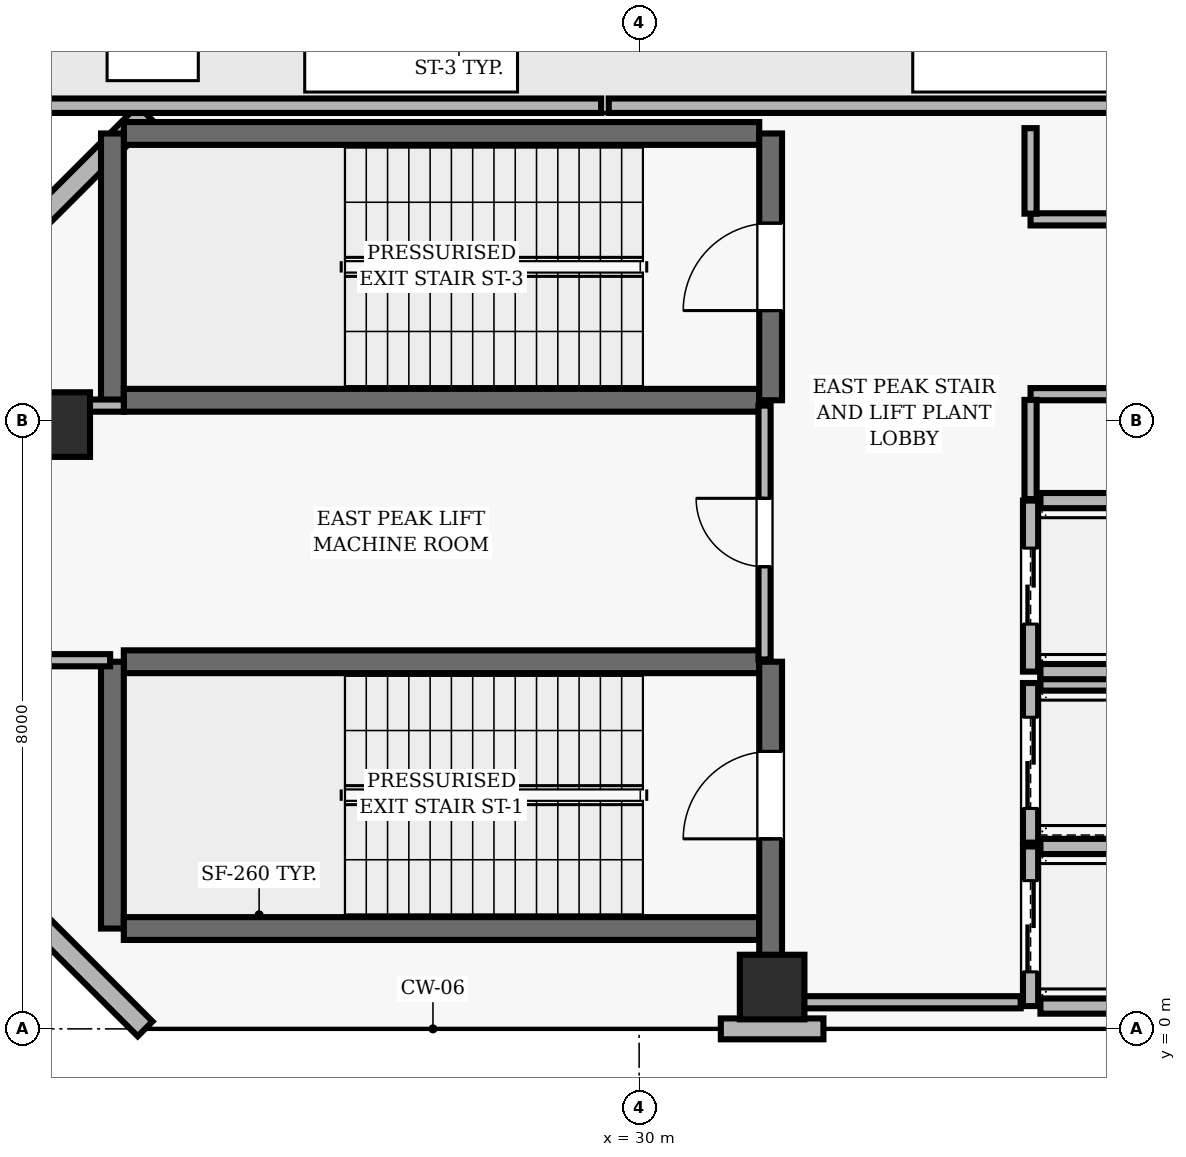
"""IFC4 building model, lengths in metres.
Left out: names, types, materials, properties, quantities, classifications, styles, units other than length and angle.
Written with IfcOpenShell. Run it as: python <this file> out.ifc"""

import sys

from ifc_helpers import new_model, si_unit, direction, frame, frame_2d, origin, origin_2d, place, context, subcontext, project, spatial, rectangle, extrude, element, fill, save


model = new_model("IFC4")
c1 = context("Model", 3, precision=1e-05, world=origin(), true_north=direction((0.0, 1.0)))
c2 = subcontext(c1, "Body", "Model", "MODEL_VIEW")
j1 = project(units=[si_unit("LENGTHUNIT", "METRE"), si_unit("PLANEANGLEUNIT", "RADIAN")], contexts=[c1])
p1 = place(None, origin())
s1 = spatial("IfcSite", under=j1, at=p1, CompositionType="ELEMENT")
p2 = place(p1, origin())
s2 = spatial("IfcBuilding", under=s1, at=p2, CompositionType="ELEMENT")
p3 = place(p2, frame((0.0, 0.0, 316.7)))
s3 = spatial("IfcBuildingStorey", under=s2, at=p3, CompositionType="ELEMENT", Elevation=316.7)
for number, where, z_axis, x_axis in (
    (1, (31.75, 0.55, 0.0), (0.0, 0.0, 1.0), (1.0, 0.0, 0.0)),
    (2, (22.35, 7.95, 0.0), (0.0, 0.0, 1.0), (1.0, 0.0, 0.0)),
):
    element("IfcColumn", number, at=place(p3, frame(where, z_axis=z_axis, x_axis=x_axis)), inside=s3, PredefinedType="COLUMN", context=c2, shape_type="SweptSolid", body=[
        extrude(rectangle(XDim=0.85, YDim=0.85, at=origin_2d()), origin(), (0.0, 0.0, 1.0), 5.0),
    ])
p4 = place(p3, frame((31.075, 0.0, 0.0), z_axis=(0.0, 0.0, 1.0), x_axis=(1.0, 0.0, 0.0)))
e3 = element("IfcWall", 3, at=p4, inside=s3, PredefinedType="SOLIDWALL", context=c2, shape_type="SweptSolid", body=[
    extrude(rectangle(XDim=1.35, YDim=0.275, at=frame_2d((0.675, 0.0))), origin(), (0.0, 0.0, 1.0), 4.74),
])
for number, where, z_axis, x_axis in (
    (4, (23.5, 12.05, 0.0), (0.0, 0.0, 1.0), (-0.707, -0.707, 0.0)),
    (5, (22.0, 1.5, 0.0), (0.0, 0.0, 1.0), (0.707, -0.707, 0.0)),
):
    element("IfcWall", number, at=place(p3, frame(where, z_axis=z_axis, x_axis=x_axis)), inside=s3, PredefinedType="SOLIDWALL", context=c2, shape_type="SweptSolid", body=[
        extrude(rectangle(XDim=2.121, YDim=0.275, at=frame_2d((1.061, 0.0))), origin(), (0.0, 0.0, 1.0), 4.74),
    ])
p5 = place(p3, frame((22.2, 12.145, 0.0), z_axis=(0.0, 0.0, 1.0), x_axis=(1.0, 0.0, 0.0)))
e6 = element("IfcWall", 6, at=p5, inside=s3, PredefinedType="PARAPET", context=c2, shape_type="SweptSolid", body=[
    extrude(rectangle(XDim=7.3, YDim=0.19, at=frame_2d((3.65, 0.0))), origin(), (0.0, 0.0, 1.0), 1.2),
])
p6 = place(p3, frame((29.6, 12.145, 0.0), z_axis=(0.0, 0.0, 1.0), x_axis=(1.0, 0.0, 0.0)))
e7 = element("IfcWall", 7, at=p6, inside=s3, PredefinedType="PARAPET", context=c2, shape_type="SweptSolid", body=[
    extrude(rectangle(XDim=7.9, YDim=0.19, at=frame_2d((3.95, 0.0))), origin(), (0.0, 0.0, 1.0), 1.2),
])
p7 = place(p3, frame((31.58, 4.83, 0.0), z_axis=(0.0, 0.0, 1.0), x_axis=(-1.0, 0.0, 0.0)))
e8 = element("IfcWall", 8, at=p7, inside=s3, PredefinedType="SHEAR", context=c2, shape_type="SweptSolid", body=[
    extrude(rectangle(XDim=8.36, YDim=0.3, at=frame_2d((4.18, 0.0))), origin(), (0.0, 0.0, 1.0), 4.74),
])
p8 = place(p3, frame((23.07, 4.83, 0.0), z_axis=(0.0, 0.0, 1.0), x_axis=(0.0, -1.0, 0.0)))
e9 = element("IfcWall", 9, at=p8, inside=s3, PredefinedType="SHEAR", context=c2, shape_type="SweptSolid", body=[
    extrude(rectangle(XDim=3.51, YDim=0.3, at=frame_2d((1.755, 0.0))), origin(), (0.0, 0.0, 1.0), 4.74),
])
p9 = place(p3, frame((23.22, 1.32, 0.0), z_axis=(0.0, 0.0, 1.0), x_axis=(1.0, 0.0, 0.0)))
e10 = element("IfcWall", 10, at=p9, inside=s3, PredefinedType="SHEAR", context=c2, shape_type="SweptSolid", body=[
    extrude(rectangle(XDim=8.36, YDim=0.3, at=frame_2d((4.18, 0.0))), origin(), (0.0, 0.0, 1.0), 4.74),
])
p10 = place(p3, frame((31.73, 0.96, 0.0), z_axis=(0.0, 0.0, 1.0), x_axis=(0.0, 1.0, 0.0)))
e11 = element("IfcWall", 11, at=p10, inside=s3, PredefinedType="SHEAR", context=c2, shape_type="SweptSolid", body=[
    extrude(rectangle(XDim=3.87, YDim=0.3, at=frame_2d((1.935, 0.0))), origin(), (0.0, 0.0, 1.0), 4.74),
])
p11 = place(p10, frame((1.54, 0.0, 0.0)))
e12 = element("IfcOpeningElement", 12, at=p11, cuts=e11, PredefinedType="OPENING", context=c2, shape_type="SweptSolid", body=[
    extrude(rectangle(XDim=1.15, YDim=2.15, at=frame_2d((0.575, 1.075))), frame((0.0, 0.16, 0.0), z_axis=(0.0, -1.0, 0.0), x_axis=(1.0, 0.0, 0.0)), (0.0, 0.0, 1.0), 0.32),
])
p12 = place(p3, frame((31.58, 11.78, 0.0), z_axis=(0.0, 0.0, 1.0), x_axis=(-1.0, 0.0, 0.0)))
e13 = element("IfcWall", 13, at=p12, inside=s3, PredefinedType="SHEAR", context=c2, shape_type="SweptSolid", body=[
    extrude(rectangle(XDim=8.36, YDim=0.3, at=frame_2d((4.18, 0.0))), origin(), (0.0, 0.0, 1.0), 4.74),
])
p13 = place(p3, frame((23.07, 11.78, 0.0), z_axis=(0.0, 0.0, 1.0), x_axis=(0.0, -1.0, 0.0)))
e14 = element("IfcWall", 14, at=p13, inside=s3, PredefinedType="SHEAR", context=c2, shape_type="SweptSolid", body=[
    extrude(rectangle(XDim=3.51, YDim=0.3, at=frame_2d((1.755, 0.0))), origin(), (0.0, 0.0, 1.0), 4.74),
])
p14 = place(p3, frame((23.22, 8.27, 0.0), z_axis=(0.0, 0.0, 1.0), x_axis=(1.0, 0.0, 0.0)))
e15 = element("IfcWall", 15, at=p14, inside=s3, PredefinedType="SHEAR", context=c2, shape_type="SweptSolid", body=[
    extrude(rectangle(XDim=8.36, YDim=0.3, at=frame_2d((4.18, 0.0))), origin(), (0.0, 0.0, 1.0), 4.74),
])
p15 = place(p3, frame((31.73, 8.27, 0.0), z_axis=(0.0, 0.0, 1.0), x_axis=(0.0, 1.0, 0.0)))
e16 = element("IfcWall", 16, at=p15, inside=s3, PredefinedType="SHEAR", context=c2, shape_type="SweptSolid", body=[
    extrude(rectangle(XDim=3.51, YDim=0.3, at=frame_2d((1.755, 0.0))), origin(), (0.0, 0.0, 1.0), 4.74),
])
p16 = place(p15, frame((1.18, 0.0, 0.0)))
e17 = element("IfcOpeningElement", 17, at=p16, cuts=e16, PredefinedType="OPENING", context=c2, shape_type="SweptSolid", body=[
    extrude(rectangle(XDim=1.15, YDim=2.15, at=frame_2d((0.575, 1.075))), frame((0.0, 0.16, 0.0), z_axis=(0.0, -1.0, 0.0), x_axis=(1.0, 0.0, 0.0)), (0.0, 0.0, 1.0), 0.32),
])
p17 = place(p3, frame((35.15, 2.4, 0.0), z_axis=(0.0, 0.0, 1.0), x_axis=(0.0, -1.0, 0.0)))
e18 = element("IfcWall", 18, at=p17, inside=s3, PredefinedType="SOLIDWALL", context=c2, shape_type="SweptSolid", body=[
    extrude(rectangle(XDim=2.1, YDim=0.2, at=frame_2d((1.05, 0.0))), origin(), (0.0, 0.0, 1.0), 4.74),
])
p18 = place(p17, frame((0.45, 0.0, 0.0)))
e19 = element("IfcOpeningElement", 19, at=p18, cuts=e18, PredefinedType="OPENING", context=c2, shape_type="SweptSolid", body=[
    extrude(rectangle(XDim=1.2, YDim=2.15, at=frame_2d((0.6, 1.075))), frame((0.0, 0.11, 0.0), z_axis=(0.0, -1.0, 0.0), x_axis=(1.0, 0.0, 0.0)), (0.0, 0.0, 1.0), 0.22),
])
for number, where, z_axis, x_axis in (
    (20, (35.28, 0.3, 0.0), (0.0, 0.0, 1.0), (1.0, 0.0, 0.0)),
    (21, (37.42, 2.4, 0.0), (0.0, 0.0, 1.0), (-1.0, 0.0, 0.0)),
):
    element("IfcWall", number, at=place(p3, frame(where, z_axis=z_axis, x_axis=x_axis)), inside=s3, PredefinedType="SOLIDWALL", context=c2, shape_type="SweptSolid", body=[
        extrude(rectangle(XDim=2.14, YDim=0.2, at=frame_2d((1.07, 0.0))), origin(), (0.0, 0.0, 1.0), 4.74),
    ])
p19 = place(p3, frame((35.15, 4.55, 0.0), z_axis=(0.0, 0.0, 1.0), x_axis=(0.0, -1.0, 0.0)))
e22 = element("IfcWall", 22, at=p19, inside=s3, PredefinedType="SOLIDWALL", context=c2, shape_type="SweptSolid", body=[
    extrude(rectangle(XDim=2.1, YDim=0.2, at=frame_2d((1.05, 0.0))), origin(), (0.0, 0.0, 1.0), 4.74),
])
p20 = place(p19, frame((0.45, 0.0, 0.0)))
e23 = element("IfcOpeningElement", 23, at=p20, cuts=e22, PredefinedType="OPENING", context=c2, shape_type="SweptSolid", body=[
    extrude(rectangle(XDim=1.2, YDim=2.15, at=frame_2d((0.6, 1.075))), frame((0.0, 0.11, 0.0), z_axis=(0.0, -1.0, 0.0), x_axis=(1.0, 0.0, 0.0)), (0.0, 0.0, 1.0), 0.22),
])
p21 = place(p3, frame((37.42, 4.55, 0.0), z_axis=(0.0, 0.0, 1.0), x_axis=(-1.0, 0.0, 0.0)))
e24 = element("IfcWall", 24, at=p21, inside=s3, PredefinedType="SOLIDWALL", context=c2, shape_type="SweptSolid", body=[
    extrude(rectangle(XDim=2.14, YDim=0.2, at=frame_2d((1.07, 0.0))), origin(), (0.0, 0.0, 1.0), 4.74),
])
p22 = place(p3, frame((35.15, 6.95, 0.0), z_axis=(0.0, 0.0, 1.0), x_axis=(0.0, -1.0, 0.0)))
e25 = element("IfcWall", 25, at=p22, inside=s3, PredefinedType="SOLIDWALL", context=c2, shape_type="SweptSolid", body=[
    extrude(rectangle(XDim=2.25, YDim=0.2, at=frame_2d((1.125, 0.0))), origin(), (0.0, 0.0, 1.0), 4.74),
])
p23 = place(p22, frame((0.625, 0.0, 0.0)))
e26 = element("IfcOpeningElement", 26, at=p23, cuts=e25, PredefinedType="OPENING", context=c2, shape_type="SweptSolid", body=[
    extrude(rectangle(XDim=1.0, YDim=2.1, at=frame_2d((0.5, 1.05))), frame((0.0, 0.11, 0.0), z_axis=(0.0, -1.0, 0.0), x_axis=(1.0, 0.0, 0.0)), (0.0, 0.0, 1.0), 0.22),
])
for number, where, z_axis, x_axis in (
    (27, (35.28, 4.7, 0.0), (0.0, 0.0, 1.0), (1.0, 0.0, 0.0)),
    (28, (37.42, 6.95, 0.0), (0.0, 0.0, 1.0), (-1.0, 0.0, 0.0)),
):
    element("IfcWall", number, at=place(p3, frame(where, z_axis=z_axis, x_axis=x_axis)), inside=s3, PredefinedType="SOLIDWALL", context=c2, shape_type="SweptSolid", body=[
        extrude(rectangle(XDim=2.14, YDim=0.2, at=frame_2d((1.07, 0.0))), origin(), (0.0, 0.0, 1.0), 4.74),
    ])
p24 = place(p3, frame((22.09, 4.85, 0.0), z_axis=(0.0, 0.0, 1.0), x_axis=(1.0, 0.0, 0.0)))
e29 = element("IfcWall", 29, at=p24, inside=s3, PredefinedType="PARTITIONING", context=c2, shape_type="SweptSolid", body=[
    extrude(rectangle(XDim=0.95, YDim=0.16, at=frame_2d((0.475, 0.0))), origin(), (0.0, 0.0, 1.0), 4.74),
])
p25 = place(p3, frame((23.22, 8.2, 0.0), z_axis=(0.0, 0.0, 1.0), x_axis=(-1.0, 0.0, 0.0)))
e30 = element("IfcWall", 30, at=p25, inside=s3, PredefinedType="PARTITIONING", context=c2, shape_type="SweptSolid", body=[
    extrude(rectangle(XDim=1.087, YDim=0.16, at=frame_2d((0.543, 0.0))), origin(), (0.0, 0.0, 1.0), 4.277),
])
p26 = place(p3, frame((31.65, 0.35, 0.0), z_axis=(0.0, 0.0, 1.0), x_axis=(1.0, 0.0, 0.0)))
e31 = element("IfcWall", 31, at=p26, inside=s3, PredefinedType="PARTITIONING", context=c2, shape_type="SweptSolid", body=[
    extrude(rectangle(XDim=3.37, YDim=0.16, at=frame_2d((1.685, 0.0))), origin(), (0.0, 0.0, 1.0), 4.74),
])
p27 = place(p3, frame((35.15, 8.35, 0.0), z_axis=(0.0, 0.0, 1.0), x_axis=(1.0, 0.0, 0.0)))
e32 = element("IfcWall", 32, at=p27, inside=s3, PredefinedType="PARTITIONING", context=c2, shape_type="SweptSolid", body=[
    extrude(rectangle(XDim=2.9, YDim=0.16, at=frame_2d((1.45, 0.0))), origin(), (0.0, 0.0, 1.0), 4.277),
])
p28 = place(p3, frame((59.513, 10.65, 0.0), z_axis=(0.0, 0.0, 1.0), x_axis=(-1.0, 0.0, 0.0)))
e33 = element("IfcWall", 33, at=p28, inside=s3, PredefinedType="PARTITIONING", context=c2, shape_type="SweptSolid", body=[
    extrude(rectangle(XDim=24.363, YDim=0.16, at=frame_2d((12.182, 0.0))), origin(), (0.0, 0.0, 1.0), 4.74),
])
p29 = place(p3, frame((31.65, 4.86, 0.0), z_axis=(0.0, 0.0, 1.0), x_axis=(0.0, 1.0, 0.0)))
e34 = element("IfcWall", 34, at=p29, inside=s3, PredefinedType="PARTITIONING", context=c2, shape_type="SweptSolid", body=[
    extrude(rectangle(XDim=3.34, YDim=0.16, at=frame_2d((1.67, 0.0))), origin(), (0.0, 0.0, 1.0), 4.74),
])
p30 = place(p29, frame((1.22, 0.0, 0.0)))
e35 = element("IfcOpeningElement", 35, at=p30, cuts=e34, PredefinedType="OPENING", context=c2, shape_type="SweptSolid", body=[
    extrude(rectangle(XDim=0.9, YDim=2.1, at=frame_2d((0.45, 1.05))), frame((0.0, 0.09, 0.0), z_axis=(0.0, -1.0, 0.0), x_axis=(1.0, 0.0, 0.0)), (0.0, 0.0, 1.0), 0.18),
])
p31 = place(p3, frame((35.15, 6.97, 0.0), z_axis=(0.0, 0.0, 1.0), x_axis=(0.0, 1.0, 0.0)))
e36 = element("IfcWall", 36, at=p31, inside=s3, PredefinedType="PARTITIONING", context=c2, shape_type="SweptSolid", body=[
    extrude(rectangle(XDim=1.305, YDim=0.16, at=frame_2d((0.652, 0.0))), origin(), (0.0, 0.0, 1.0), 4.74),
])
p32 = place(p3, frame((35.15, 10.725, 0.0), z_axis=(0.0, 0.0, 1.0), x_axis=(0.0, 1.0, 0.0)))
e37 = element("IfcWall", 37, at=p32, inside=s3, PredefinedType="PARTITIONING", context=c2, shape_type="SweptSolid", body=[
    extrude(rectangle(XDim=1.125, YDim=0.16, at=frame_2d((0.562, 0.0))), origin(), (0.0, 0.0, 1.0), 4.74),
])
p33 = place(p3, frame((0.0, 0.0, -0.26)))
p34 = place(p33, frame((27.0, 12.925, 0.0)))
p35 = place(p34, frame((0.0, 0.0, 0.21)))
e38 = element("IfcWindow", 38, at=p35, inside=s3, PartitioningType="SINGLE_PANEL", PredefinedType="SKYLIGHT", context=c2, shape_type="SweptSolid", body=[
    extrude(rectangle(XDim=2.8, YDim=1.2, at=origin_2d()), origin(), (0.0, 0.0, 1.0), 0.05),
])
p36 = place(p33, frame((35.0, 12.925, 0.0)))
p37 = place(p36, frame((0.0, 0.0, 0.21)))
e39 = element("IfcWindow", 39, at=p37, inside=s3, PartitioningType="SINGLE_PANEL", PredefinedType="SKYLIGHT", context=c2, shape_type="SweptSolid", body=[
    extrude(rectangle(XDim=2.8, YDim=1.2, at=origin_2d()), origin(), (0.0, 0.0, 1.0), 0.05),
])
p38 = place(p33, frame((23.6, 12.925, 0.0)))
p39 = place(p38, frame((0.0, 0.0, 0.21)))
e40 = element("IfcDoor", 40, at=p39, inside=s3, OperationType="SINGLE_SWING_LEFT", PredefinedType="TRAPDOOR", context=c2, shape_type="SweptSolid", body=[
    extrude(rectangle(XDim=1.2, YDim=0.9, at=origin_2d()), origin(), (0.0, 0.0, 1.0), 0.05),
])
p40 = place(p11, origin())
e41 = element("IfcDoor", 41, at=p40, inside=s3, OperationType="SINGLE_SWING_LEFT", PredefinedType="DOOR", context=c2, shape_type="SweptSolid", body=[
    extrude(rectangle(XDim=1.15, YDim=2.15, at=frame_2d((0.575, 1.075))), frame((0.0, 0.025, 0.0), z_axis=(0.0, -1.0, 0.0), x_axis=(1.0, 0.0, 0.0)), (0.0, 0.0, 1.0), 0.05),
])
fill(e12, e41)
p41 = place(p16, origin())
e42 = element("IfcDoor", 42, at=p41, inside=s3, OperationType="SINGLE_SWING_LEFT", PredefinedType="DOOR", context=c2, shape_type="SweptSolid", body=[
    extrude(rectangle(XDim=1.15, YDim=2.15, at=frame_2d((0.575, 1.075))), frame((0.0, 0.025, 0.0), z_axis=(0.0, -1.0, 0.0), x_axis=(1.0, 0.0, 0.0)), (0.0, 0.0, 1.0), 0.05),
])
fill(e17, e42)
p42 = place(p18, origin())
e43 = element("IfcDoor", 43, at=p42, inside=s3, OperationType="DOUBLE_DOOR_SLIDING", PredefinedType="DOOR", context=c2, shape_type="SweptSolid", body=[
    extrude(rectangle(XDim=1.2, YDim=2.15, at=frame_2d((0.6, 1.075))), frame((0.0, 0.025, 0.0), z_axis=(0.0, -1.0, 0.0), x_axis=(1.0, 0.0, 0.0)), (0.0, 0.0, 1.0), 0.05),
])
fill(e19, e43)
p43 = place(p20, origin())
e44 = element("IfcDoor", 44, at=p43, inside=s3, OperationType="DOUBLE_DOOR_SLIDING", PredefinedType="DOOR", context=c2, shape_type="SweptSolid", body=[
    extrude(rectangle(XDim=1.2, YDim=2.15, at=frame_2d((0.6, 1.075))), frame((0.0, 0.025, 0.0), z_axis=(0.0, -1.0, 0.0), x_axis=(1.0, 0.0, 0.0)), (0.0, 0.0, 1.0), 0.05),
])
fill(e23, e44)
p44 = place(p23, origin())
e45 = element("IfcDoor", 45, at=p44, inside=s3, OperationType="DOUBLE_DOOR_SLIDING", PredefinedType="DOOR", context=c2, shape_type="SweptSolid", body=[
    extrude(rectangle(XDim=1.0, YDim=2.1, at=frame_2d((0.5, 1.05))), frame((0.0, 0.025, 0.0), z_axis=(0.0, -1.0, 0.0), x_axis=(1.0, 0.0, 0.0)), (0.0, 0.0, 1.0), 0.05),
])
fill(e26, e45)
p45 = place(p30, origin())
e46 = element("IfcDoor", 46, at=p45, inside=s3, OperationType="SINGLE_SWING_RIGHT", PredefinedType="DOOR", context=c2, shape_type="SweptSolid", body=[
    extrude(rectangle(XDim=0.9, YDim=2.1, at=frame_2d((0.45, 1.05))), frame((0.0, 0.025, 0.0), z_axis=(0.0, -1.0, 0.0), x_axis=(1.0, 0.0, 0.0)), (0.0, 0.0, 1.0), 0.05),
])
fill(e35, e46)
save(model, sys.argv[1])
